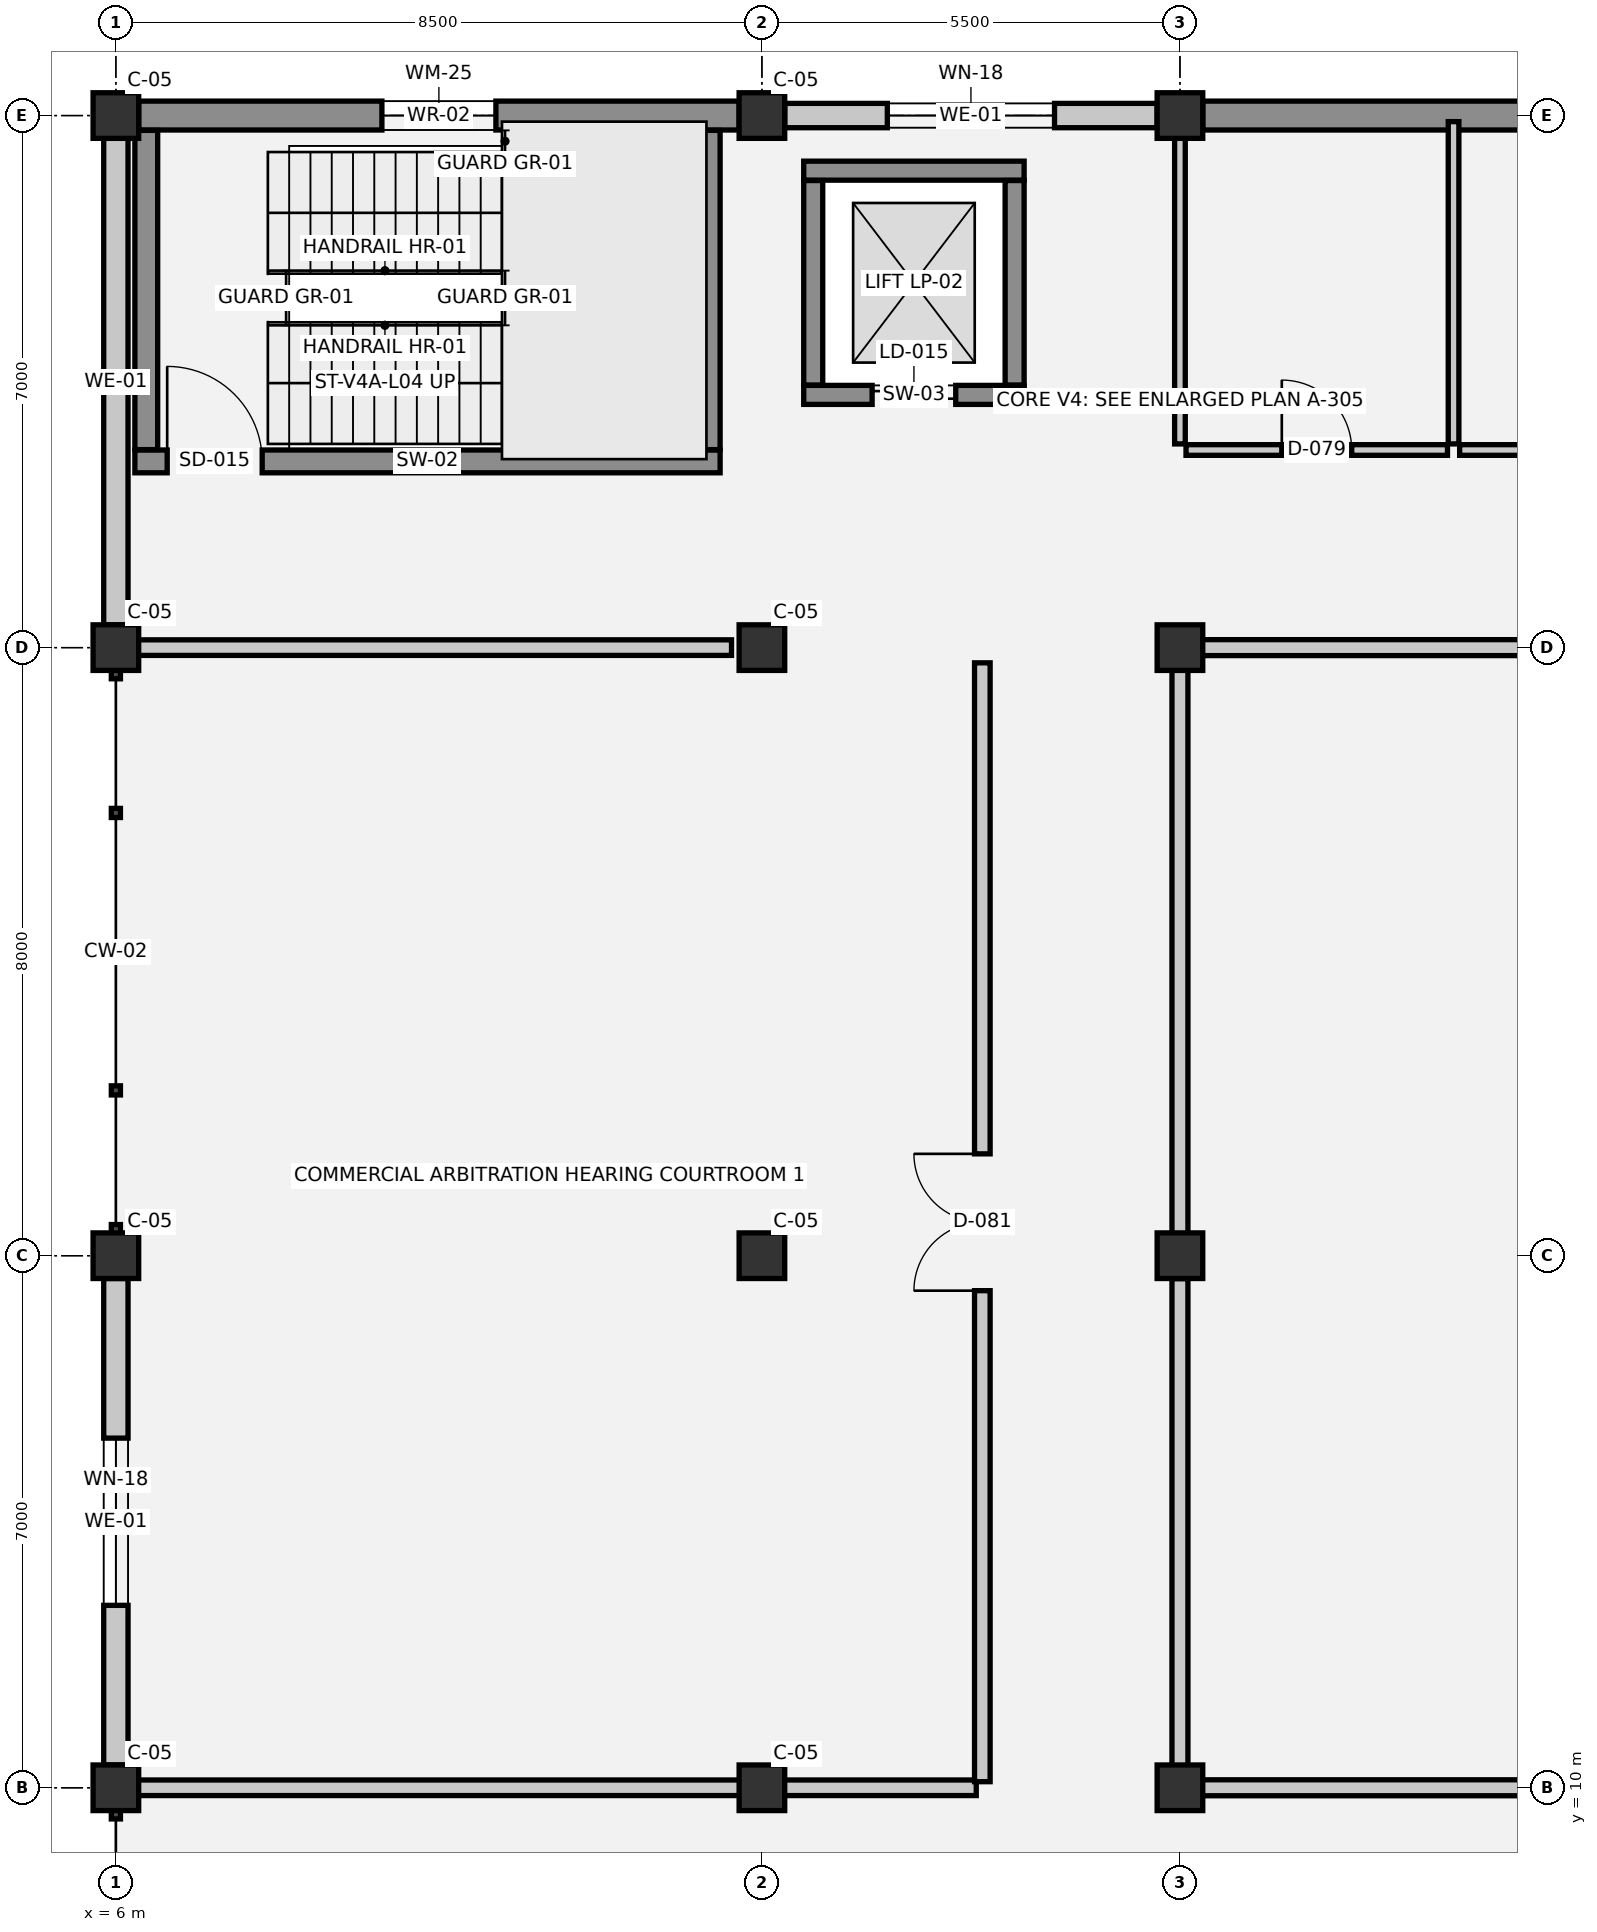
"""IFC4 building model, lengths in metres.
Left out: names, types, materials, properties, quantities, classifications, styles, units other than length and angle.
Written with IfcOpenShell. Run it as: python <this file> out.ifc"""

import sys

from ifc_helpers import new_model, si_unit, direction, frame, frame_2d, origin, origin_2d, place, context, subcontext, project, spatial, rectangle, extrude, element, fill, save


model = new_model("IFC4")
c1 = context("Model", 3, precision=1e-05, world=origin(), true_north=direction((0.0, 1.0)))
c2 = subcontext(c1, "Body", "Model", "MODEL_VIEW")
j1 = project(units=[si_unit("LENGTHUNIT", "METRE"), si_unit("PLANEANGLEUNIT", "RADIAN")], contexts=[c1])
p1 = place(None, origin())
s1 = spatial("IfcSite", under=j1, at=p1, CompositionType="ELEMENT")
p2 = place(p1, origin())
s2 = spatial("IfcBuilding", under=s1, at=p2, CompositionType="ELEMENT")
p3 = place(p2, frame((0.0, 0.0, 14.4)))
s3 = spatial("IfcBuildingStorey", under=s2, at=p3, CompositionType="ELEMENT", Elevation=14.4)
for number, where, z_axis, x_axis in (
    (1, (6.0, 10.0, 0.0), (0.0, 0.0, 1.0), (1.0, 0.0, 0.0)),
    (2, (6.0, 17.0, 0.0), (0.0, 0.0, 1.0), (1.0, 0.0, 0.0)),
    (3, (6.0, 25.0, 0.0), (0.0, 0.0, 1.0), (1.0, 0.0, 0.0)),
    (4, (6.0, 32.0, 0.0), (0.0, 0.0, 1.0), (1.0, 0.0, 0.0)),
    (5, (14.5, 10.0, 0.0), (0.0, 0.0, 1.0), (1.0, 0.0, 0.0)),
    (6, (14.5, 17.0, 0.0), (0.0, 0.0, 1.0), (1.0, 0.0, 0.0)),
    (7, (14.5, 25.0, 0.0), (0.0, 0.0, 1.0), (1.0, 0.0, 0.0)),
    (8, (14.5, 32.0, 0.0), (0.0, 0.0, 1.0), (1.0, 0.0, 0.0)),
    (9, (20.0, 10.0, 0.0), (0.0, 0.0, 1.0), (1.0, 0.0, 0.0)),
    (10, (20.0, 17.0, 0.0), (0.0, 0.0, 1.0), (1.0, 0.0, 0.0)),
    (11, (20.0, 25.0, 0.0), (0.0, 0.0, 1.0), (1.0, 0.0, 0.0)),
    (12, (20.0, 32.0, 0.0), (0.0, 0.0, 1.0), (1.0, 0.0, 0.0)),
):
    element("IfcColumn", number, at=place(p3, frame(where, z_axis=z_axis, x_axis=x_axis)), inside=s3, PredefinedType="COLUMN", context=c2, shape_type="SweptSolid", body=[
        extrude(rectangle(XDim=0.6, YDim=0.6, at=origin_2d()), origin(), (0.0, 0.0, 1.0), 3.9),
    ])
p4 = place(p3, frame((6.0, 10.3, 0.0), z_axis=(0.0, 0.0, 1.0), x_axis=(0.0, 1.0, 0.0)))
e13 = element("IfcWall", 13, at=p4, inside=s3, PredefinedType="SOLIDWALL", context=c2, shape_type="SweptSolid", body=[
    extrude(rectangle(XDim=6.4, YDim=0.32, at=frame_2d((3.2, 0.0))), origin(), (0.0, 0.0, 1.0), 2.61),
])
p5 = place(p4, frame((2.1, 0.0, 0.9)))
e14 = element("IfcOpeningElement", 14, at=p5, cuts=e13, PredefinedType="OPENING", context=c2, shape_type="SweptSolid", body=[
    extrude(rectangle(XDim=2.2, YDim=1.0, at=frame_2d((1.1, 0.5))), frame((0.0, 0.17, 0.0), z_axis=(0.0, -1.0, 0.0), x_axis=(1.0, 0.0, 0.0)), (0.0, 0.0, 1.0), 0.34),
])
p6 = place(p3, frame((6.0, 25.3, 0.0), z_axis=(0.0, 0.0, 1.0), x_axis=(0.0, 1.0, 0.0)))
e15 = element("IfcWall", 15, at=p6, inside=s3, PredefinedType="SOLIDWALL", context=c2, shape_type="SweptSolid", body=[
    extrude(rectangle(XDim=6.4, YDim=0.32, at=frame_2d((3.2, 0.0))), origin(), (0.0, 0.0, 1.0), 2.61),
])
p7 = place(p3, frame((6.3, 32.0, 0.0), z_axis=(0.0, 0.0, 1.0), x_axis=(1.0, 0.0, 0.0)))
e16 = element("IfcWall", 16, at=p7, inside=s3, PredefinedType="STANDARD", context=c2, shape_type="SweptSolid", body=[
    extrude(rectangle(XDim=7.9, YDim=0.38, at=frame_2d((3.95, 0.0))), origin(), (0.0, 0.0, 1.0), 2.61),
])
p8 = place(p7, frame((3.2, 0.0, 0.95)))
e17 = element("IfcOpeningElement", 17, at=p8, cuts=e16, PredefinedType="OPENING", context=c2, shape_type="SweptSolid", body=[
    extrude(rectangle(XDim=1.5, YDim=1.35, at=frame_2d((0.75, 0.675))), frame((0.0, 0.2, 0.0), z_axis=(0.0, -1.0, 0.0), x_axis=(1.0, 0.0, 0.0)), (0.0, 0.0, 1.0), 0.4),
])
p9 = place(p3, frame((14.8, 32.0, 0.0), z_axis=(0.0, 0.0, 1.0), x_axis=(1.0, 0.0, 0.0)))
e18 = element("IfcWall", 18, at=p9, inside=s3, PredefinedType="SOLIDWALL", context=c2, shape_type="SweptSolid", body=[
    extrude(rectangle(XDim=4.9, YDim=0.32, at=frame_2d((2.45, 0.0))), origin(), (0.0, 0.0, 1.0), 2.61),
])
p10 = place(p9, frame((1.35, 0.0, 0.9)))
e19 = element("IfcOpeningElement", 19, at=p10, cuts=e18, PredefinedType="OPENING", context=c2, shape_type="SweptSolid", body=[
    extrude(rectangle(XDim=2.2, YDim=1.0, at=frame_2d((1.1, 0.5))), frame((0.0, 0.17, 0.0), z_axis=(0.0, -1.0, 0.0), x_axis=(1.0, 0.0, 0.0)), (0.0, 0.0, 1.0), 0.34),
])
p11 = place(p3, frame((20.3, 32.0, 0.0), z_axis=(0.0, 0.0, 1.0), x_axis=(1.0, 0.0, 0.0)))
e20 = element("IfcWall", 20, at=p11, inside=s3, PredefinedType="STANDARD", context=c2, shape_type="SweptSolid", body=[
    extrude(rectangle(XDim=14.4, YDim=0.38, at=frame_2d((7.2, 0.0))), origin(), (0.0, 0.0, 1.0), 2.61),
])
p12 = place(p11, frame((4.68, 0.0, 0.95)))
e21 = element("IfcOpeningElement", 21, at=p12, cuts=e20, PredefinedType="OPENING", context=c2, shape_type="SweptSolid", body=[
    extrude(rectangle(XDim=1.8, YDim=1.35, at=frame_2d((0.9, 0.675))), frame((0.0, 0.2, 0.0), z_axis=(0.0, -1.0, 0.0), x_axis=(1.0, 0.0, 0.0)), (0.0, 0.0, 1.0), 0.4),
])
p13 = place(p3, frame((15.05, 28.325, 0.0), z_axis=(0.0, 0.0, 1.0), x_axis=(1.0, 0.0, 0.0)))
e22 = element("IfcWall", 22, at=p13, inside=s3, PredefinedType="SHEAR", context=c2, shape_type="SweptSolid", body=[
    extrude(rectangle(XDim=2.9, YDim=0.25, at=frame_2d((1.45, 0.0))), origin(), (0.0, 0.0, 1.0), 3.9),
])
p14 = place(p13, frame((0.9, 0.0, 0.0)))
e23 = element("IfcOpeningElement", 23, at=p14, cuts=e22, PredefinedType="OPENING", context=c2, shape_type="SweptSolid", body=[
    extrude(rectangle(XDim=1.1, YDim=2.15, at=frame_2d((0.55, 1.075))), frame((0.0, 0.135, 0.0), z_axis=(0.0, -1.0, 0.0), x_axis=(1.0, 0.0, 0.0)), (0.0, 0.0, 1.0), 0.27),
])
p15 = place(p3, frame((17.95, 31.275, 0.0), z_axis=(0.0, 0.0, 1.0), x_axis=(-1.0, 0.0, 0.0)))
e24 = element("IfcWall", 24, at=p15, inside=s3, PredefinedType="SHEAR", context=c2, shape_type="SweptSolid", body=[
    extrude(rectangle(XDim=2.9, YDim=0.25, at=frame_2d((1.45, 0.0))), origin(), (0.0, 0.0, 1.0), 3.9),
])
for number, where, z_axis, x_axis in (
    (25, (15.175, 31.145, 0.0), (0.0, 0.0, 1.0), (0.0, -1.0, 0.0)),
    (26, (17.825, 28.455, 0.0), (0.0, 0.0, 1.0), (0.0, 1.0, 0.0)),
):
    element("IfcWall", number, at=place(p3, frame(where, z_axis=z_axis, x_axis=x_axis)), inside=s3, PredefinedType="SHEAR", context=c2, shape_type="SweptSolid", body=[
        extrude(rectangle(XDim=2.69, YDim=0.25, at=frame_2d((1.345, 0.0))), origin(), (0.0, 0.0, 1.0), 3.9),
    ])
p16 = place(p3, frame((6.25, 27.45, 0.0), z_axis=(0.0, 0.0, 1.0), x_axis=(1.0, 0.0, 0.0)))
e27 = element("IfcWall", 27, at=p16, inside=s3, PredefinedType="SHEAR", context=c2, shape_type="SweptSolid", body=[
    extrude(rectangle(XDim=7.7, YDim=0.3, at=frame_2d((3.85, 0.0))), origin(), (0.0, 0.0, 1.0), 3.64),
])
p17 = place(p16, frame((0.425, 0.0, 0.0)))
e28 = element("IfcOpeningElement", 28, at=p17, cuts=e27, PredefinedType="OPENING", context=c2, shape_type="SweptSolid", body=[
    extrude(rectangle(XDim=1.25, YDim=2.15, at=frame_2d((0.625, 1.075))), frame((0.0, 0.16, 0.0), z_axis=(0.0, -1.0, 0.0), x_axis=(1.0, 0.0, 0.0)), (0.0, 0.0, 1.0), 0.32),
])
for number, where, z_axis, x_axis in (
    (29, (6.4, 31.805, 0.0), (0.0, 0.0, 1.0), (0.0, -1.0, 0.0)),
    (30, (13.8, 27.605, 0.0), (0.0, 0.0, 1.0), (0.0, 1.0, 0.0)),
):
    element("IfcWall", number, at=place(p3, frame(where, z_axis=z_axis, x_axis=x_axis)), inside=s3, PredefinedType="SHEAR", context=c2, shape_type="SweptSolid", body=[
        extrude(rectangle(XDim=4.2, YDim=0.3, at=frame_2d((2.1, 0.0))), origin(), (0.0, 0.0, 1.0), 3.64),
    ])
p18 = place(p3, frame((6.08, 10.0, 0.0), z_axis=(0.0, 0.0, 1.0), x_axis=(1.0, 0.0, 0.0)))
e31 = element("IfcWall", 31, at=p18, inside=s3, PredefinedType="PARTITIONING", context=c2, shape_type="SweptSolid", body=[
    extrude(rectangle(XDim=11.24, YDim=0.205, at=frame_2d((5.62, 0.0))), origin(), (0.0, 0.0, 1.0), 2.88),
])
p19 = place(p3, frame((20.08, 10.0, 0.0), z_axis=(0.0, 0.0, 1.0), x_axis=(1.0, 0.0, 0.0)))
e32 = element("IfcWall", 32, at=p19, inside=s3, PredefinedType="PARTITIONING", context=c2, shape_type="SweptSolid", body=[
    extrude(rectangle(XDim=21.99, YDim=0.21, at=frame_2d((10.995, 0.0))), origin(), (0.0, 0.0, 1.0), 2.63),
])
p20 = place(p3, frame((6.08, 25.0, 0.0), z_axis=(0.0, 0.0, 1.0), x_axis=(1.0, 0.0, 0.0)))
e33 = element("IfcWall", 33, at=p20, inside=s3, PredefinedType="PARTITIONING", context=c2, shape_type="SweptSolid", body=[
    extrude(rectangle(XDim=8.02, YDim=0.205, at=frame_2d((4.01, 0.0))), origin(), (0.0, 0.0, 1.0), 2.88),
])
p21 = place(p3, frame((20.08, 25.0, 0.0), z_axis=(0.0, 0.0, 1.0), x_axis=(1.0, 0.0, 0.0)))
e34 = element("IfcWall", 34, at=p21, inside=s3, PredefinedType="PARTITIONING", context=c2, shape_type="SweptSolid", body=[
    extrude(rectangle(XDim=21.99, YDim=0.21, at=frame_2d((10.995, 0.0))), origin(), (0.0, 0.0, 1.0), 2.63),
])
p22 = place(p21, frame((10.095, 0.0, 0.0)))
e35 = element("IfcOpeningElement", 35, at=p22, cuts=e34, PredefinedType="OPENING", context=c2, shape_type="SweptSolid", body=[
    extrude(rectangle(XDim=1.8, YDim=2.3, at=frame_2d((0.9, 1.15))), frame((0.0, 0.115, 0.0), z_axis=(0.0, -1.0, 0.0), x_axis=(1.0, 0.0, 0.0)), (0.0, 0.0, 1.0), 0.23),
])
p23 = place(p3, frame((20.08, 27.6, 0.0), z_axis=(0.0, 0.0, 1.0), x_axis=(1.0, 0.0, 0.0)))
e36 = element("IfcWall", 36, at=p23, inside=s3, PredefinedType="PLUMBINGWALL", context=c2, shape_type="SweptSolid", body=[
    extrude(rectangle(XDim=3.44, YDim=0.14, at=frame_2d((1.72, 0.0))), origin(), (0.0, 0.0, 1.0), 3.54),
])
p24 = place(p23, frame((1.26, 0.0, 0.0)))
e37 = element("IfcOpeningElement", 37, at=p24, cuts=e36, PredefinedType="OPENING", context=c2, shape_type="SweptSolid", body=[
    extrude(rectangle(XDim=0.92, YDim=2.1, at=frame_2d((0.46, 1.05))), frame((0.0, 0.08, 0.0), z_axis=(0.0, -1.0, 0.0), x_axis=(1.0, 0.0, 0.0)), (0.0, 0.0, 1.0), 0.16),
])
p25 = place(p3, frame((23.68, 27.6, 0.0), z_axis=(0.0, 0.0, 1.0), x_axis=(1.0, 0.0, 0.0)))
e38 = element("IfcWall", 38, at=p25, inside=s3, PredefinedType="PLUMBINGWALL", context=c2, shape_type="SweptSolid", body=[
    extrude(rectangle(XDim=3.24, YDim=0.14, at=frame_2d((1.62, 0.0))), origin(), (0.0, 0.0, 1.0), 3.54),
])
p26 = place(p25, frame((1.14, 0.0, 0.0)))
e39 = element("IfcOpeningElement", 39, at=p26, cuts=e38, PredefinedType="OPENING", context=c2, shape_type="SweptSolid", body=[
    extrude(rectangle(XDim=0.96, YDim=2.1, at=frame_2d((0.48, 1.05))), frame((0.0, 0.08, 0.0), z_axis=(0.0, -1.0, 0.0), x_axis=(1.0, 0.0, 0.0)), (0.0, 0.0, 1.0), 0.16),
])
p27 = place(p3, frame((17.4, 10.08, 0.0), z_axis=(0.0, 0.0, 1.0), x_axis=(0.0, 1.0, 0.0)))
e40 = element("IfcWall", 40, at=p27, inside=s3, PredefinedType="PARTITIONING", context=c2, shape_type="SweptSolid", body=[
    extrude(rectangle(XDim=14.72, YDim=0.205, at=frame_2d((7.36, 0.0))), origin(), (0.0, 0.0, 1.0), 3.54),
])
p28 = place(p27, frame((6.46, 0.0, 0.0)))
e41 = element("IfcOpeningElement", 41, at=p28, cuts=e40, PredefinedType="OPENING", context=c2, shape_type="SweptSolid", body=[
    extrude(rectangle(XDim=1.8, YDim=2.3, at=frame_2d((0.9, 1.15))), frame((0.0, 0.113, 0.0), z_axis=(0.0, -1.0, 0.0), x_axis=(1.0, 0.0, 0.0)), (0.0, 0.0, 1.0), 0.225),
])
p29 = place(p3, frame((20.0, 10.08, 0.0), z_axis=(0.0, 0.0, 1.0), x_axis=(0.0, 1.0, 0.0)))
e42 = element("IfcWall", 42, at=p29, inside=s3, PredefinedType="PARTITIONING", context=c2, shape_type="SweptSolid", body=[
    extrude(rectangle(XDim=6.62, YDim=0.21, at=frame_2d((3.31, 0.0))), origin(), (0.0, 0.0, 1.0), 3.03),
])
p30 = place(p3, frame((20.0, 16.7, 0.0), z_axis=(0.0, 0.0, 1.0), x_axis=(0.0, 1.0, 0.0)))
e43 = element("IfcWall", 43, at=p30, inside=s3, PredefinedType="PARTITIONING", context=c2, shape_type="SweptSolid", body=[
    extrude(rectangle(XDim=8.22, YDim=0.21, at=frame_2d((4.11, 0.0))), origin(), (0.0, 0.0, 1.0), 2.88),
])
p31 = place(p3, frame((20.0, 27.68, 0.0), z_axis=(0.0, 0.0, 1.0), x_axis=(0.0, 1.0, 0.0)))
e44 = element("IfcWall", 44, at=p31, inside=s3, PredefinedType="PLUMBINGWALL", context=c2, shape_type="SweptSolid", body=[
    extrude(rectangle(XDim=4.24, YDim=0.14, at=frame_2d((2.12, 0.0))), origin(), (0.0, 0.0, 1.0), 3.03),
])
p32 = place(p3, frame((23.6, 27.68, 0.0), z_axis=(0.0, 0.0, 1.0), x_axis=(0.0, 1.0, 0.0)))
e45 = element("IfcWall", 45, at=p32, inside=s3, PredefinedType="PLUMBINGWALL", context=c2, shape_type="SweptSolid", body=[
    extrude(rectangle(XDim=4.24, YDim=0.14, at=frame_2d((2.12, 0.0))), origin(), (0.0, 0.0, 1.0), 3.54),
])
p33 = place(p5, origin())
e46 = element("IfcWindow", 46, at=p33, inside=s3, PartitioningType="SINGLE_PANEL", PredefinedType="WINDOW", context=c2, shape_type="SweptSolid", body=[
    extrude(rectangle(XDim=2.2, YDim=1.0, at=frame_2d((1.1, 0.5))), frame((0.0, 0.03, 0.0), z_axis=(0.0, -1.0, 0.0), x_axis=(1.0, 0.0, 0.0)), (0.0, 0.0, 1.0), 0.06),
])
fill(e14, e46)
p34 = place(p10, origin())
e47 = element("IfcWindow", 47, at=p34, inside=s3, PartitioningType="SINGLE_PANEL", PredefinedType="WINDOW", context=c2, shape_type="SweptSolid", body=[
    extrude(rectangle(XDim=2.2, YDim=1.0, at=frame_2d((1.1, 0.5))), frame((0.0, 0.03, 0.0), z_axis=(0.0, -1.0, 0.0), x_axis=(1.0, 0.0, 0.0)), (0.0, 0.0, 1.0), 0.06),
])
fill(e19, e47)
p35 = place(p14, origin())
e48 = element("IfcDoor", 48, at=p35, inside=s3, OperationType="DOUBLE_DOOR_SLIDING", PredefinedType="DOOR", context=c2, shape_type="SweptSolid", body=[
    extrude(rectangle(XDim=1.1, YDim=2.15, at=frame_2d((0.55, 1.075))), frame((0.0, 0.025, 0.0), z_axis=(0.0, -1.0, 0.0), x_axis=(1.0, 0.0, 0.0)), (0.0, 0.0, 1.0), 0.05),
])
fill(e23, e48)
p36 = place(p17, origin())
e49 = element("IfcDoor", 49, at=p36, inside=s3, OperationType="SINGLE_SWING_LEFT", PredefinedType="DOOR", context=c2, shape_type="SweptSolid", body=[
    extrude(rectangle(XDim=1.25, YDim=2.15, at=frame_2d((0.625, 1.075))), frame((0.0, 0.025, 0.0), z_axis=(0.0, -1.0, 0.0), x_axis=(1.0, 0.0, 0.0)), (0.0, 0.0, 1.0), 0.05),
])
fill(e28, e49)
p37 = place(p24, origin())
e50 = element("IfcDoor", 50, at=p37, inside=s3, OperationType="SINGLE_SWING_LEFT", PredefinedType="DOOR", context=c2, shape_type="SweptSolid", body=[
    extrude(rectangle(XDim=0.92, YDim=2.1, at=frame_2d((0.46, 1.05))), frame((0.0, 0.025, 0.0), z_axis=(0.0, -1.0, 0.0), x_axis=(1.0, 0.0, 0.0)), (0.0, 0.0, 1.0), 0.05),
])
fill(e37, e50)
p38 = place(p28, origin())
e51 = element("IfcDoor", 51, at=p38, inside=s3, OperationType="DOUBLE_DOOR_SINGLE_SWING", PredefinedType="DOOR", context=c2, shape_type="SweptSolid", body=[
    extrude(rectangle(XDim=1.8, YDim=2.3, at=frame_2d((0.9, 1.15))), frame((0.0, 0.025, 0.0), z_axis=(0.0, -1.0, 0.0), x_axis=(1.0, 0.0, 0.0)), (0.0, 0.0, 1.0), 0.05),
])
fill(e41, e51)
p39 = place(p8, origin())
e52 = element("IfcWindow", 52, at=p39, inside=s3, PartitioningType="SINGLE_PANEL", PredefinedType="WINDOW", context=c2, shape_type="SweptSolid", body=[
    extrude(rectangle(XDim=1.5, YDim=1.35, at=frame_2d((0.75, 0.675))), frame((0.0, 0.03, 0.0), z_axis=(0.0, -1.0, 0.0), x_axis=(1.0, 0.0, 0.0)), (0.0, 0.0, 1.0), 0.06),
])
fill(e17, e52)
save(model, sys.argv[1])
